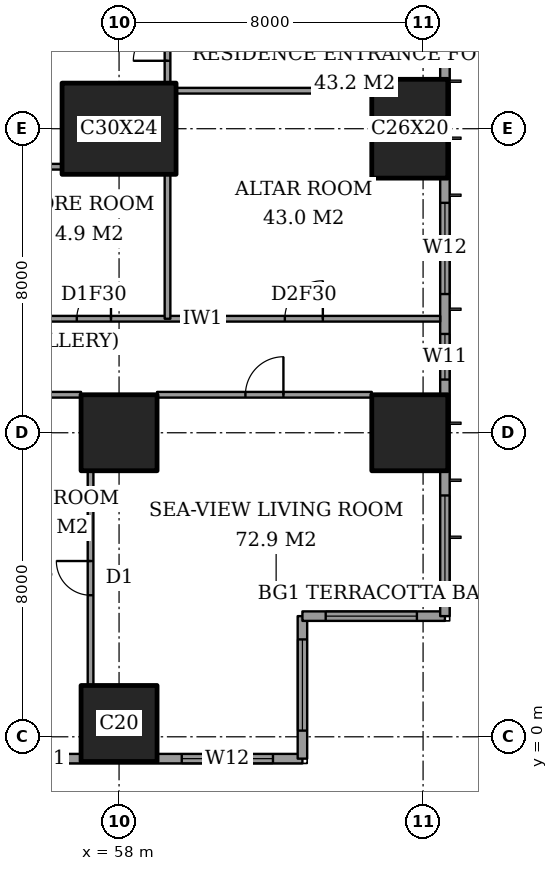
"""IFC4 building model, lengths in metres.
Left out: names, types, materials, properties, quantities, classifications, styles, units other than length and angle.
Written with IfcOpenShell. Run it as: python <this file> out.ifc"""

import sys

from ifc_helpers import new_model, si_unit, direction, frame, frame_2d, origin, origin_2d, place, context, subcontext, project, spatial, rectangle, extrude, element, fill, save


model = new_model("IFC4")
c1 = context("Model", 3, precision=1e-05, world=origin(), true_north=direction((0.0, 1.0)))
c2 = subcontext(c1, "Body", "Model", "MODEL_VIEW")
j1 = project(units=[si_unit("LENGTHUNIT", "METRE"), si_unit("PLANEANGLEUNIT", "RADIAN")], contexts=[c1])
p1 = place(None, origin())
s1 = spatial("IfcSite", under=j1, at=p1, CompositionType="ELEMENT")
p2 = place(p1, origin())
s2 = spatial("IfcBuilding", under=s1, at=p2, CompositionType="ELEMENT")
p3 = place(p2, frame((0.0, 0.0, 164.6)))
s3 = spatial("IfcBuildingStorey", under=s2, at=p3, CompositionType="ELEMENT", Elevation=164.6)
for number, where, z_axis, x_axis in (
    (1, (58.0, 0.35, 0.0), (0.0, 0.0, 1.0), (1.0, 0.0, 0.0)),
    (2, (58.0, 8.0, 0.0), (0.0, 0.0, 1.0), (1.0, 0.0, 0.0)),
):
    element("IfcColumn", number, at=place(p3, frame(where, z_axis=z_axis, x_axis=x_axis)), inside=s3, PredefinedType="COLUMN", context=c2, shape_type="SweptSolid", body=[
        extrude(rectangle(XDim=2.0, YDim=2.0, at=origin_2d()), origin(), (0.0, 0.0, 1.0), 3.6),
    ])
p4 = place(p3, frame((58.0, 16.0, 0.0), z_axis=(0.0, 0.0, 1.0), x_axis=(1.0, 0.0, 0.0)))
e3 = element("IfcColumn", 3, at=p4, inside=s3, PredefinedType="COLUMN", context=c2, shape_type="SweptSolid", body=[
    extrude(rectangle(XDim=3.0, YDim=2.4, at=origin_2d()), origin(), (0.0, 0.0, 1.0), 3.6),
])
p5 = place(p3, frame((65.65, 8.0, 0.0), z_axis=(0.0, 0.0, 1.0), x_axis=(1.0, 0.0, 0.0)))
e4 = element("IfcColumn", 4, at=p5, inside=s3, PredefinedType="COLUMN", context=c2, shape_type="SweptSolid", body=[
    extrude(rectangle(XDim=2.0, YDim=2.0, at=origin_2d()), origin(), (0.0, 0.0, 1.0), 3.6),
])
p6 = place(p3, frame((65.65, 16.0, 0.0), z_axis=(0.0, 0.0, 1.0), x_axis=(0.0, 1.0, 0.0)))
e5 = element("IfcColumn", 5, at=p6, inside=s3, PredefinedType="COLUMN", context=c2, shape_type="SweptSolid", body=[
    extrude(rectangle(XDim=2.6, YDim=2.0, at=origin_2d()), origin(), (0.0, 0.0, 1.0), 3.6),
])
p7 = place(p3, frame((41.425, -0.575, 0.0), z_axis=(0.0, 0.0, 1.0), x_axis=(1.0, 0.0, 0.0)))
e6 = element("IfcWall", 6, at=p7, inside=s3, PredefinedType="SOLIDWALL", context=c2, shape_type="SweptSolid", body=[
    extrude(rectangle(XDim=21.4, YDim=0.25, at=frame_2d((10.7, 0.0))), origin(), (0.0, 0.0, 1.0), 3.6),
])
p8 = place(p7, frame((2.65, 0.0, 0.4)))
e7 = element("IfcOpeningElement", 7, at=p8, cuts=e6, PredefinedType="OPENING", context=c2, shape_type="SweptSolid", body=[
    extrude(rectangle(XDim=1.2, YDim=2.2, at=frame_2d((0.6, 1.1))), frame((0.0, 0.135, 0.0), z_axis=(0.0, -1.0, 0.0), x_axis=(1.0, 0.0, 0.0)), (0.0, 0.0, 1.0), 0.27),
])
p9 = place(p7, frame((5.475, 0.0, 0.4)))
e8 = element("IfcOpeningElement", 8, at=p9, cuts=e6, PredefinedType="OPENING", context=c2, shape_type="SweptSolid", body=[
    extrude(rectangle(XDim=1.2, YDim=2.2, at=frame_2d((0.6, 1.1))), frame((0.0, 0.135, 0.0), z_axis=(0.0, -1.0, 0.0), x_axis=(1.0, 0.0, 0.0)), (0.0, 0.0, 1.0), 0.27),
])
p10 = place(p7, frame((10.375, 0.0, 0.4)))
e9 = element("IfcOpeningElement", 9, at=p10, cuts=e6, PredefinedType="OPENING", context=c2, shape_type="SweptSolid", body=[
    extrude(rectangle(XDim=2.4, YDim=2.2, at=frame_2d((1.2, 1.1))), frame((0.0, 0.135, 0.0), z_axis=(0.0, -1.0, 0.0), x_axis=(1.0, 0.0, 0.0)), (0.0, 0.0, 1.0), 0.27),
])
p11 = place(p7, frame((13.975, 0.0, 0.4)))
e10 = element("IfcOpeningElement", 10, at=p11, cuts=e6, PredefinedType="OPENING", context=c2, shape_type="SweptSolid", body=[
    extrude(rectangle(XDim=1.2, YDim=2.2, at=frame_2d((0.6, 1.1))), frame((0.0, 0.135, 0.0), z_axis=(0.0, -1.0, 0.0), x_axis=(1.0, 0.0, 0.0)), (0.0, 0.0, 1.0), 0.27),
])
p12 = place(p7, frame((18.225, 0.0, 0.4)))
e11 = element("IfcOpeningElement", 11, at=p12, cuts=e6, PredefinedType="OPENING", context=c2, shape_type="SweptSolid", body=[
    extrude(rectangle(XDim=2.4, YDim=2.2, at=frame_2d((1.2, 1.1))), frame((0.0, 0.135, 0.0), z_axis=(0.0, -1.0, 0.0), x_axis=(1.0, 0.0, 0.0)), (0.0, 0.0, 1.0), 0.27),
])
p13 = place(p3, frame((62.825, -0.575, 0.0), z_axis=(0.0, 0.0, 1.0), x_axis=(0.0, 1.0, 0.0)))
e12 = element("IfcWall", 12, at=p13, inside=s3, PredefinedType="SOLIDWALL", context=c2, shape_type="SweptSolid", body=[
    extrude(rectangle(XDim=3.75, YDim=0.25, at=frame_2d((1.875, 0.0))), origin(), (0.0, 0.0, 1.0), 3.6),
])
p14 = place(p13, frame((0.738, 0.0, 0.4)))
e13 = element("IfcOpeningElement", 13, at=p14, cuts=e12, PredefinedType="OPENING", context=c2, shape_type="SweptSolid", body=[
    extrude(rectangle(XDim=2.4, YDim=2.2, at=frame_2d((1.2, 1.1))), frame((0.0, 0.135, 0.0), z_axis=(0.0, -1.0, 0.0), x_axis=(1.0, 0.0, 0.0)), (0.0, 0.0, 1.0), 0.27),
])
p15 = place(p3, frame((62.825, 3.175, 0.0), z_axis=(0.0, 0.0, 1.0), x_axis=(1.0, 0.0, 0.0)))
e14 = element("IfcWall", 14, at=p15, inside=s3, PredefinedType="SOLIDWALL", context=c2, shape_type="SweptSolid", body=[
    extrude(rectangle(XDim=3.75, YDim=0.25, at=frame_2d((1.875, 0.0))), origin(), (0.0, 0.0, 1.0), 3.6),
])
p16 = place(p15, frame((0.613, 0.0, 0.4)))
e15 = element("IfcOpeningElement", 15, at=p16, cuts=e14, PredefinedType="OPENING", context=c2, shape_type="SweptSolid", body=[
    extrude(rectangle(XDim=2.4, YDim=2.2, at=frame_2d((1.2, 1.1))), frame((0.0, 0.135, 0.0), z_axis=(0.0, -1.0, 0.0), x_axis=(1.0, 0.0, 0.0)), (0.0, 0.0, 1.0), 0.27),
])
p17 = place(p3, frame((66.575, 3.175, 0.0), z_axis=(0.0, 0.0, 1.0), x_axis=(0.0, 1.0, 0.0)))
e16 = element("IfcWall", 16, at=p17, inside=s3, PredefinedType="SOLIDWALL", context=c2, shape_type="SweptSolid", body=[
    extrude(rectangle(XDim=41.65, YDim=0.25, at=frame_2d((20.825, 0.0))), origin(), (0.0, 0.0, 1.0), 3.6),
])
p18 = place(p17, frame((0.775, 0.0, 0.4)))
e17 = element("IfcOpeningElement", 17, at=p18, cuts=e16, PredefinedType="OPENING", context=c2, shape_type="SweptSolid", body=[
    extrude(rectangle(XDim=2.4, YDim=2.2, at=frame_2d((1.2, 1.1))), frame((0.0, 0.135, 0.0), z_axis=(0.0, -1.0, 0.0), x_axis=(1.0, 0.0, 0.0)), (0.0, 0.0, 1.0), 0.27),
])
p19 = place(p17, frame((6.225, 0.0, 0.4)))
e18 = element("IfcOpeningElement", 18, at=p19, cuts=e16, PredefinedType="OPENING", context=c2, shape_type="SweptSolid", body=[
    extrude(rectangle(XDim=1.2, YDim=2.2, at=frame_2d((0.6, 1.1))), frame((0.0, 0.135, 0.0), z_axis=(0.0, -1.0, 0.0), x_axis=(1.0, 0.0, 0.0)), (0.0, 0.0, 1.0), 0.27),
])
p20 = place(p17, frame((8.475, 0.0, 0.4)))
e19 = element("IfcOpeningElement", 19, at=p20, cuts=e16, PredefinedType="OPENING", context=c2, shape_type="SweptSolid", body=[
    extrude(rectangle(XDim=2.4, YDim=2.2, at=frame_2d((1.2, 1.1))), frame((0.0, 0.135, 0.0), z_axis=(0.0, -1.0, 0.0), x_axis=(1.0, 0.0, 0.0)), (0.0, 0.0, 1.0), 0.27),
])
p21 = place(p17, frame((15.775, 0.0, 0.4)))
e20 = element("IfcOpeningElement", 20, at=p21, cuts=e16, PredefinedType="OPENING", context=c2, shape_type="SweptSolid", body=[
    extrude(rectangle(XDim=2.4, YDim=2.2, at=frame_2d((1.2, 1.1))), frame((0.0, 0.135, 0.0), z_axis=(0.0, -1.0, 0.0), x_axis=(1.0, 0.0, 0.0)), (0.0, 0.0, 1.0), 0.27),
])
p22 = place(p17, frame((23.475, 0.0, 0.4)))
e21 = element("IfcOpeningElement", 21, at=p22, cuts=e16, PredefinedType="OPENING", context=c2, shape_type="SweptSolid", body=[
    extrude(rectangle(XDim=2.4, YDim=2.2, at=frame_2d((1.2, 1.1))), frame((0.0, 0.135, 0.0), z_axis=(0.0, -1.0, 0.0), x_axis=(1.0, 0.0, 0.0)), (0.0, 0.0, 1.0), 0.27),
])
p23 = place(p17, frame((30.975, 0.0, 0.4)))
e22 = element("IfcOpeningElement", 22, at=p23, cuts=e16, PredefinedType="OPENING", context=c2, shape_type="SweptSolid", body=[
    extrude(rectangle(XDim=2.4, YDim=2.2, at=frame_2d((1.2, 1.1))), frame((0.0, 0.135, 0.0), z_axis=(0.0, -1.0, 0.0), x_axis=(1.0, 0.0, 0.0)), (0.0, 0.0, 1.0), 0.27),
])
p24 = place(p17, frame((34.5, 0.0, 0.4)))
e23 = element("IfcOpeningElement", 23, at=p24, cuts=e16, PredefinedType="OPENING", context=c2, shape_type="SweptSolid", body=[
    extrude(rectangle(XDim=1.2, YDim=2.2, at=frame_2d((0.6, 1.1))), frame((0.0, 0.135, 0.0), z_axis=(0.0, -1.0, 0.0), x_axis=(1.0, 0.0, 0.0)), (0.0, 0.0, 1.0), 0.27),
])
p25 = place(p17, frame((38.475, 0.0, 0.4)))
e24 = element("IfcOpeningElement", 24, at=p25, cuts=e16, PredefinedType="OPENING", context=c2, shape_type="SweptSolid", body=[
    extrude(rectangle(XDim=2.4, YDim=2.2, at=frame_2d((1.2, 1.1))), frame((0.0, 0.135, 0.0), z_axis=(0.0, -1.0, 0.0), x_axis=(1.0, 0.0, 0.0)), (0.0, 0.0, 1.0), 0.27),
])
p26 = place(p3, frame((51.2, 9.0, 0.0), z_axis=(0.0, 0.0, 1.0), x_axis=(1.0, 0.0, 0.0)))
e25 = element("IfcWall", 25, at=p26, inside=s3, PredefinedType="PARTITIONING", context=c2, shape_type="SweptSolid", body=[
    extrude(rectangle(XDim=5.8, YDim=0.15, at=frame_2d((2.9, 0.0))), origin(), (0.0, 0.0, 1.0), 3.35),
])
p27 = place(p26, frame((1.4, 0.0, 0.0)))
e26 = element("IfcOpeningElement", 26, at=p27, cuts=e25, PredefinedType="OPENING", context=c2, shape_type="SweptSolid", body=[
    extrude(rectangle(XDim=1.0, YDim=2.1, at=frame_2d((0.5, 1.05))), frame((0.0, 0.085, 0.0), z_axis=(0.0, -1.0, 0.0), x_axis=(1.0, 0.0, 0.0)), (0.0, 0.0, 1.0), 0.17),
])
p28 = place(p3, frame((59.0, 9.0, 0.0), z_axis=(0.0, 0.0, 1.0), x_axis=(1.0, 0.0, 0.0)))
e27 = element("IfcWall", 27, at=p28, inside=s3, PredefinedType="PARTITIONING", context=c2, shape_type="SweptSolid", body=[
    extrude(rectangle(XDim=5.65, YDim=0.15, at=frame_2d((2.825, 0.0))), origin(), (0.0, 0.0, 1.0), 3.35),
])
p29 = place(p28, frame((2.325, 0.0, 0.0)))
e28 = element("IfcOpeningElement", 28, at=p29, cuts=e27, PredefinedType="OPENING", context=c2, shape_type="SweptSolid", body=[
    extrude(rectangle(XDim=1.0, YDim=2.1, at=frame_2d((0.5, 1.05))), frame((0.0, 0.085, 0.0), z_axis=(0.0, -1.0, 0.0), x_axis=(1.0, 0.0, 0.0)), (0.0, 0.0, 1.0), 0.17),
])
p30 = place(p3, frame((41.439, 11.0, 0.0), z_axis=(0.0, 0.0, 1.0), x_axis=(1.0, 0.0, 0.0)))
e29 = element("IfcWall", 29, at=p30, inside=s3, PredefinedType="PARTITIONING", context=c2, shape_type="SweptSolid", body=[
    extrude(rectangle(XDim=25.011, YDim=0.15, at=frame_2d((12.505, 0.0))), origin(), (0.0, 0.0, 1.0), 3.35),
])
p31 = place(p30, frame((12.361, 0.0, 0.0)))
e30 = element("IfcOpeningElement", 30, at=p31, cuts=e29, PredefinedType="OPENING", context=c2, shape_type="SweptSolid", body=[
    extrude(rectangle(XDim=1.0, YDim=2.1, at=frame_2d((0.5, 1.05))), frame((0.0, 0.085, 0.0), z_axis=(0.0, -1.0, 0.0), x_axis=(1.0, 0.0, 0.0)), (0.0, 0.0, 1.0), 0.17),
])
p32 = place(p30, frame((20.924, 0.0, 0.0)))
e31 = element("IfcOpeningElement", 31, at=p32, cuts=e29, PredefinedType="OPENING", context=c2, shape_type="SweptSolid", body=[
    extrude(rectangle(XDim=1.0, YDim=2.1, at=frame_2d((0.5, 1.05))), frame((0.0, 0.085, 0.0), z_axis=(0.0, -1.0, 0.0), x_axis=(1.0, 0.0, 0.0)), (0.0, 0.0, 1.0), 0.17),
])
p33 = place(p30, frame((15.448, 0.0, 0.0)))
e32 = element("IfcOpeningElement", 32, at=p33, cuts=e29, PredefinedType="OPENING", context=c2, shape_type="SweptSolid", body=[
    extrude(rectangle(XDim=0.9, YDim=2.1, at=frame_2d((0.45, 1.05))), frame((0.0, 0.085, 0.0), z_axis=(0.0, -1.0, 0.0), x_axis=(1.0, 0.0, 0.0)), (0.0, 0.0, 1.0), 0.17),
])
p34 = place(p30, frame((9.961, 0.0, 0.0)))
e33 = element("IfcOpeningElement", 33, at=p34, cuts=e29, PredefinedType="OPENING", context=c2, shape_type="SweptSolid", body=[
    extrude(rectangle(XDim=1.0, YDim=2.1, at=frame_2d((0.5, 1.05))), frame((0.0, 0.085, 0.0), z_axis=(0.0, -1.0, 0.0), x_axis=(1.0, 0.0, 0.0)), (0.0, 0.0, 1.0), 0.17),
])
p35 = place(p30, frame((7.411, 0.0, 0.0)))
e34 = element("IfcOpeningElement", 34, at=p35, cuts=e29, PredefinedType="OPENING", context=c2, shape_type="SweptSolid", body=[
    extrude(rectangle(XDim=0.9, YDim=2.1, at=frame_2d((0.45, 1.05))), frame((0.0, 0.085, 0.0), z_axis=(0.0, -1.0, 0.0), x_axis=(1.0, 0.0, 0.0)), (0.0, 0.0, 1.0), 0.17),
])
p36 = place(p30, frame((2.836, 0.0, 0.0)))
e35 = element("IfcOpeningElement", 35, at=p36, cuts=e29, PredefinedType="OPENING", context=c2, shape_type="SweptSolid", body=[
    extrude(rectangle(XDim=1.0, YDim=2.1, at=frame_2d((0.5, 1.05))), frame((0.0, 0.085, 0.0), z_axis=(0.0, -1.0, 0.0), x_axis=(1.0, 0.0, 0.0)), (0.0, 0.0, 1.0), 0.17),
])
p37 = place(p3, frame((55.4, 15.0, 0.0), z_axis=(0.0, 0.0, 1.0), x_axis=(1.0, 0.0, 0.0)))
e36 = element("IfcWall", 36, at=p37, inside=s3, PredefinedType="PARTITIONING", context=c2, shape_type="SweptSolid", body=[
    extrude(rectangle(XDim=1.1, YDim=0.15, at=frame_2d((0.55, 0.0))), origin(), (0.0, 0.0, 1.0), 3.35),
])
p38 = place(p3, frame((59.5, 17.0, 0.0), z_axis=(0.0, 0.0, 1.0), x_axis=(1.0, 0.0, 0.0)))
e37 = element("IfcWall", 37, at=p38, inside=s3, PredefinedType="PARTITIONING", context=c2, shape_type="SweptSolid", body=[
    extrude(rectangle(XDim=5.15, YDim=0.15, at=frame_2d((2.575, 0.0))), origin(), (0.0, 0.0, 1.0), 3.35),
])
p39 = place(p3, frame((57.25, 1.35, 0.0), z_axis=(0.0, 0.0, 1.0), x_axis=(0.0, 1.0, 0.0)))
e38 = element("IfcWall", 38, at=p39, inside=s3, PredefinedType="PARTITIONING", context=c2, shape_type="SweptSolid", body=[
    extrude(rectangle(XDim=5.65, YDim=0.15, at=frame_2d((2.825, 0.0))), origin(), (0.0, 0.0, 1.0), 3.35),
])
p40 = place(p39, frame((2.375, 0.0, 0.0)))
e39 = element("IfcOpeningElement", 39, at=p40, cuts=e38, PredefinedType="OPENING", context=c2, shape_type="SweptSolid", body=[
    extrude(rectangle(XDim=0.9, YDim=2.1, at=frame_2d((0.45, 1.05))), frame((0.0, 0.085, 0.0), z_axis=(0.0, -1.0, 0.0), x_axis=(1.0, 0.0, 0.0)), (0.0, 0.0, 1.0), 0.17),
])
p41 = place(p3, frame((59.275, 11.0, 0.0), z_axis=(0.0, 0.0, 1.0), x_axis=(0.0, 1.0, 0.0)))
e40 = element("IfcWall", 40, at=p41, inside=s3, PredefinedType="PARTITIONING", context=c2, shape_type="SweptSolid", body=[
    extrude(rectangle(XDim=3.8, YDim=0.15, at=frame_2d((1.9, 0.0))), origin(), (0.0, 0.0, 1.0), 3.35),
])
p42 = place(p3, frame((59.275, 17.2, 0.0), z_axis=(0.0, 0.0, 1.0), x_axis=(0.0, 1.0, 0.0)))
e41 = element("IfcWall", 41, at=p42, inside=s3, PredefinedType="PARTITIONING", context=c2, shape_type="SweptSolid", body=[
    extrude(rectangle(XDim=2.45, YDim=0.15, at=frame_2d((1.225, 0.0))), origin(), (0.0, 0.0, 1.0), 3.35),
])
p43 = place(p42, frame((0.587, 0.0, 0.0)))
e42 = element("IfcOpeningElement", 42, at=p43, cuts=e41, PredefinedType="OPENING", context=c2, shape_type="SweptSolid", body=[
    extrude(rectangle(XDim=0.9, YDim=2.1, at=frame_2d((0.45, 1.05))), frame((0.0, 0.085, 0.0), z_axis=(0.0, -1.0, 0.0), x_axis=(1.0, 0.0, 0.0)), (0.0, 0.0, 1.0), 0.17),
])
p44 = place(p11, origin())
e43 = element("IfcWindow", 43, at=p44, inside=s3, PartitioningType="SINGLE_PANEL", PredefinedType="WINDOW", context=c2, shape_type="SweptSolid", body=[
    extrude(rectangle(XDim=1.2, YDim=2.2, at=frame_2d((0.6, 1.1))), frame((0.0, 0.03, 0.0), z_axis=(0.0, -1.0, 0.0), x_axis=(1.0, 0.0, 0.0)), (0.0, 0.0, 1.0), 0.06),
])
fill(e10, e43)
p45 = place(p12, origin())
e44 = element("IfcWindow", 44, at=p45, inside=s3, PartitioningType="SINGLE_PANEL", PredefinedType="WINDOW", context=c2, shape_type="SweptSolid", body=[
    extrude(rectangle(XDim=2.4, YDim=2.2, at=frame_2d((1.2, 1.1))), frame((0.0, 0.03, 0.0), z_axis=(0.0, -1.0, 0.0), x_axis=(1.0, 0.0, 0.0)), (0.0, 0.0, 1.0), 0.06),
])
fill(e11, e44)
p46 = place(p14, origin())
e45 = element("IfcWindow", 45, at=p46, inside=s3, PartitioningType="SINGLE_PANEL", PredefinedType="WINDOW", context=c2, shape_type="SweptSolid", body=[
    extrude(rectangle(XDim=2.4, YDim=2.2, at=frame_2d((1.2, 1.1))), frame((0.0, 0.03, 0.0), z_axis=(0.0, -1.0, 0.0), x_axis=(1.0, 0.0, 0.0)), (0.0, 0.0, 1.0), 0.06),
])
fill(e13, e45)
p47 = place(p16, origin())
e46 = element("IfcWindow", 46, at=p47, inside=s3, PartitioningType="SINGLE_PANEL", PredefinedType="WINDOW", context=c2, shape_type="SweptSolid", body=[
    extrude(rectangle(XDim=2.4, YDim=2.2, at=frame_2d((1.2, 1.1))), frame((0.0, 0.03, 0.0), z_axis=(0.0, -1.0, 0.0), x_axis=(1.0, 0.0, 0.0)), (0.0, 0.0, 1.0), 0.06),
])
fill(e15, e46)
p48 = place(p18, origin())
e47 = element("IfcWindow", 47, at=p48, inside=s3, PartitioningType="SINGLE_PANEL", PredefinedType="WINDOW", context=c2, shape_type="SweptSolid", body=[
    extrude(rectangle(XDim=2.4, YDim=2.2, at=frame_2d((1.2, 1.1))), frame((0.0, 0.03, 0.0), z_axis=(0.0, -1.0, 0.0), x_axis=(1.0, 0.0, 0.0)), (0.0, 0.0, 1.0), 0.06),
])
fill(e17, e47)
p49 = place(p19, origin())
e48 = element("IfcWindow", 48, at=p49, inside=s3, PartitioningType="SINGLE_PANEL", PredefinedType="WINDOW", context=c2, shape_type="SweptSolid", body=[
    extrude(rectangle(XDim=1.2, YDim=2.2, at=frame_2d((0.6, 1.1))), frame((0.0, 0.03, 0.0), z_axis=(0.0, -1.0, 0.0), x_axis=(1.0, 0.0, 0.0)), (0.0, 0.0, 1.0), 0.06),
])
fill(e18, e48)
p50 = place(p20, origin())
e49 = element("IfcWindow", 49, at=p50, inside=s3, PartitioningType="SINGLE_PANEL", PredefinedType="WINDOW", context=c2, shape_type="SweptSolid", body=[
    extrude(rectangle(XDim=2.4, YDim=2.2, at=frame_2d((1.2, 1.1))), frame((0.0, 0.03, 0.0), z_axis=(0.0, -1.0, 0.0), x_axis=(1.0, 0.0, 0.0)), (0.0, 0.0, 1.0), 0.06),
])
fill(e19, e49)
p51 = place(p29, origin())
e50 = element("IfcDoor", 50, at=p51, inside=s3, OperationType="SINGLE_SWING_LEFT", PredefinedType="DOOR", context=c2, shape_type="SweptSolid", body=[
    extrude(rectangle(XDim=1.0, YDim=2.1, at=frame_2d((0.5, 1.05))), frame((0.0, 0.025, 0.0), z_axis=(0.0, -1.0, 0.0), x_axis=(1.0, 0.0, 0.0)), (0.0, 0.0, 1.0), 0.05),
])
fill(e28, e50)
p52 = place(p40, origin())
e51 = element("IfcDoor", 51, at=p52, inside=s3, OperationType="SINGLE_SWING_LEFT", PredefinedType="DOOR", context=c2, shape_type="SweptSolid", body=[
    extrude(rectangle(XDim=0.9, YDim=2.1, at=frame_2d((0.45, 1.05))), frame((0.0, 0.025, 0.0), z_axis=(0.0, -1.0, 0.0), x_axis=(1.0, 0.0, 0.0)), (0.0, 0.0, 1.0), 0.05),
])
fill(e39, e51)
p53 = place(p32, origin())
e52 = element("IfcDoor", 52, at=p53, inside=s3, OperationType="SINGLE_SWING_LEFT", PredefinedType="DOOR", context=c2, shape_type="SweptSolid", body=[
    extrude(rectangle(XDim=1.0, YDim=2.1, at=frame_2d((0.5, 1.05))), frame((0.0, 0.025, 0.0), z_axis=(0.0, -1.0, 0.0), x_axis=(1.0, 0.0, 0.0)), (0.0, 0.0, 1.0), 0.05),
])
fill(e31, e52)
p54 = place(p43, origin())
e53 = element("IfcDoor", 53, at=p54, inside=s3, OperationType="SINGLE_SWING_RIGHT", PredefinedType="DOOR", context=c2, shape_type="SweptSolid", body=[
    extrude(rectangle(XDim=0.9, YDim=2.1, at=frame_2d((0.45, 1.05))), frame((0.0, 0.025, 0.0), z_axis=(0.0, -1.0, 0.0), x_axis=(1.0, 0.0, 0.0)), (0.0, 0.0, 1.0), 0.05),
])
fill(e42, e53)
p55 = place(p33, origin())
e54 = element("IfcDoor", 54, at=p55, inside=s3, OperationType="SINGLE_SWING_LEFT", PredefinedType="DOOR", context=c2, shape_type="SweptSolid", body=[
    extrude(rectangle(XDim=0.9, YDim=2.1, at=frame_2d((0.45, 1.05))), frame((0.0, 0.025, 0.0), z_axis=(0.0, -1.0, 0.0), x_axis=(1.0, 0.0, 0.0)), (0.0, 0.0, 1.0), 0.05),
])
fill(e32, e54)
save(model, sys.argv[1])
